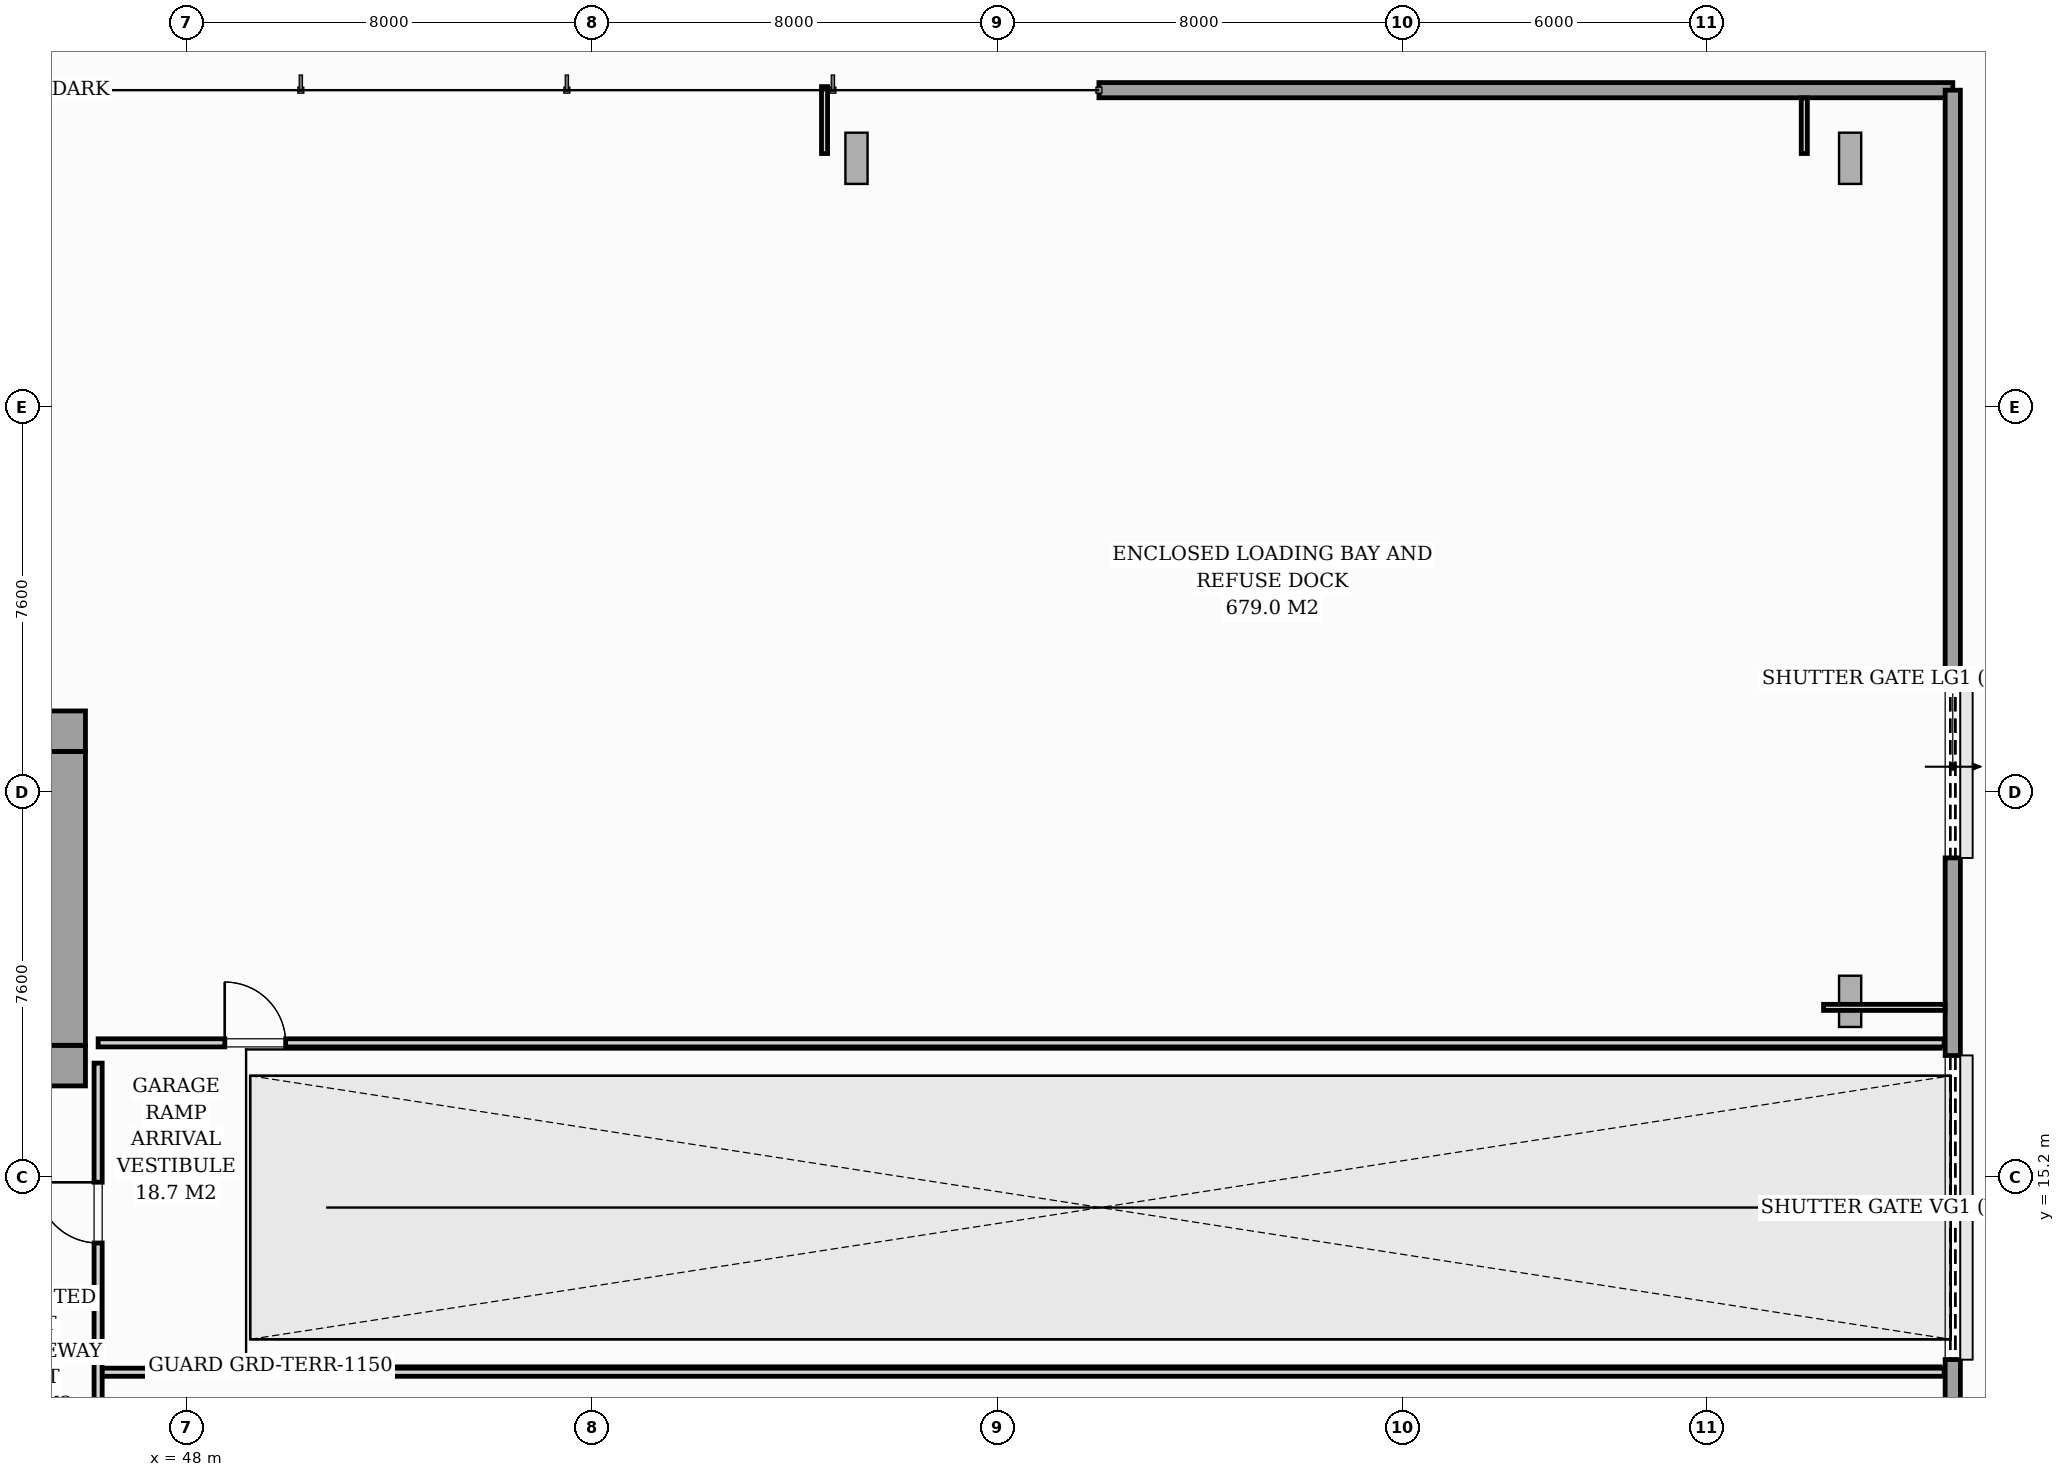
"""IFC4 building model, lengths in metres.
Left out: names, types, materials, properties, quantities, classifications, styles, units other than length and angle.
Written with IfcOpenShell. Run it as: python <this file> out.ifc"""

import sys

from ifc_helpers import new_model, si_unit, direction, frame, frame_2d, origin, origin_2d, place, context, subcontext, project, spatial, rectangle, i_section, extrude, source, transform, mapped, element, fill, save


model = new_model("IFC4")
c1 = context("Model", 3, precision=1e-05, world=origin(), true_north=direction((0.0, 1.0)))
c2 = subcontext(c1, "Body", "Model", "MODEL_VIEW")
j1 = project(units=[si_unit("LENGTHUNIT", "METRE"), si_unit("PLANEANGLEUNIT", "RADIAN")], contexts=[c1])
p1 = place(None, origin())
s1 = spatial("IfcSite", under=j1, at=p1, CompositionType="ELEMENT")
p2 = place(p1, origin())
s2 = spatial("IfcBuilding", under=s1, at=p2, CompositionType="ELEMENT")
p3 = place(p2, origin())
s3 = spatial("IfcBuildingStorey", under=s2, at=p3, CompositionType="ELEMENT", Elevation=0.0)
m1 = source(origin(), c2, "Body", "SweptSolid", [
    extrude(i_section(OverallWidth=0.437, OverallDepth=0.514, WebThickness=0.061, FlangeThickness=0.097, FilletRadius=0.018, at=origin_2d()), origin(), (0.0, 0.0, 1.0), 4.996),
])
for number, where, z_axis, x_axis in (
    (1, (45.6, 17.4, 0.002), (0.0, 0.0, 1.0), (1.0, 0.0, 0.0)),
    (2, (45.6, 24.0, 0.002), (0.0, 0.0, 1.0), (1.0, 0.0, 0.0)),
):
    element("IfcColumn", number, at=place(p3, frame(where, z_axis=z_axis, x_axis=x_axis)), inside=s3, PredefinedType="PILASTER", context=c2, shape_type="MappedRepresentation", body=[
        mapped(m1, transform((0.0, 0.0, 0.0), scale=1.0)),
    ])
m2 = source(origin(), c2, "Body", "SweptSolid", [
    extrude(i_section(OverallWidth=0.438, OverallDepth=1.011, WebThickness=0.041, FlangeThickness=0.074, FilletRadius=0.024, at=origin_2d()), origin(), (0.0, 0.0, 1.0), 5.12),
])
p4 = place(p3, frame((61.835, 35.586, 0.129), z_axis=(-0.488415288712, -0.221174585925, 0.844116288371), x_axis=(0.768948067591, 0.348211397919, 0.536160136253)))
e3 = element("IfcColumn", 3, at=p4, inside=s3, PredefinedType="COLUMN", context=c2, shape_type="MappedRepresentation", body=[
    mapped(m2, transform((0.0, 0.0, 0.0), scale=1.0)),
])
m3 = source(origin(), c2, "Body", "SweptSolid", [
    extrude(i_section(OverallWidth=0.438, OverallDepth=1.011, WebThickness=0.041, FlangeThickness=0.074, FilletRadius=0.024, at=origin_2d()), origin(), (0.0, 0.0, 1.0), 5.658),
])
p5 = place(p3, frame((81.691, 35.579, 0.156), z_axis=(-0.625927781854, -0.197654592174, 0.754418368079), x_axis=(0.719402526438, 0.227171915187, 0.656393880155)))
e4 = element("IfcColumn", 4, at=p5, inside=s3, PredefinedType="COLUMN", context=c2, shape_type="MappedRepresentation", body=[
    mapped(m3, transform((0.0, 0.0, 0.0), scale=1.0)),
])
m4 = source(origin(), c2, "Body", "SweptSolid", [
    extrude(i_section(OverallWidth=0.438, OverallDepth=1.011, WebThickness=0.041, FlangeThickness=0.074, FilletRadius=0.024, at=origin_2d()), origin(), (0.0, 0.0, 1.0), 5.575),
])
p6 = place(p3, frame((81.694, 18.783, 0.152), z_axis=(-0.636293391775, -0.083735492124, 0.766889227295), x_axis=(0.760333659123, 0.100059051294, 0.641779489434)))
e5 = element("IfcColumn", 5, at=p6, inside=s3, PredefinedType="COLUMN", context=c2, shape_type="MappedRepresentation", body=[
    mapped(m4, transform((0.0, 0.0, 0.0), scale=1.0)),
])
p7 = place(p3, frame((66.0, 36.65, 0.0), z_axis=(0.0, 0.0, 1.0), x_axis=(1.0, 0.0, 0.0)))
e6 = element("IfcWall", 6, at=p7, inside=s3, PredefinedType="STANDARD", context=c2, shape_type="SweptSolid", body=[
    extrude(rectangle(XDim=16.85, YDim=0.3, at=frame_2d((8.425, 0.0))), origin(), (0.0, 0.0, 1.0), 4.58),
])
p8 = place(p3, frame((82.85, 36.65, 0.0), z_axis=(0.0, 0.0, 1.0), x_axis=(0.0, -1.0, 0.0)))
e7 = element("IfcWall", 7, at=p8, inside=s3, PredefinedType="STANDARD", context=c2, shape_type="SweptSolid", body=[
    extrude(rectangle(XDim=35.7, YDim=0.3, at=frame_2d((17.85, 0.0))), origin(), (0.0, 0.0, 1.0), 4.58),
])
p9 = place(p8, frame((11.55, 0.0, 0.0)))
e8 = element("IfcOpeningElement", 8, at=p9, cuts=e7, PredefinedType="OPENING", context=c2, shape_type="SweptSolid", body=[
    extrude(rectangle(XDim=3.6, YDim=3.8, at=frame_2d((1.8, 1.9))), frame((0.0, 0.16, 0.0), z_axis=(0.0, -1.0, 0.0), x_axis=(1.0, 0.0, 0.0)), (0.0, 0.0, 1.0), 0.32),
])
p10 = place(p8, frame((19.05, 0.0, 0.0)))
e9 = element("IfcOpeningElement", 9, at=p10, cuts=e7, PredefinedType="OPENING", context=c2, shape_type="SweptSolid", body=[
    extrude(rectangle(XDim=6.0, YDim=3.2, at=frame_2d((3.0, 1.6))), frame((0.0, 0.16, 0.0), z_axis=(0.0, -1.0, 0.0), x_axis=(1.0, 0.0, 0.0)), (0.0, 0.0, 1.0), 0.32),
])
p11 = place(p8, frame((26.8, 0.0, 0.9)))
e10 = element("IfcOpeningElement", 10, at=p11, cuts=e7, PredefinedType="OPENING", context=c2, shape_type="SweptSolid", body=[
    extrude(rectangle(XDim=2.0, YDim=2.4, at=frame_2d((1.0, 1.2))), frame((0.0, 0.16, 0.0), z_axis=(0.0, -1.0, 0.0), x_axis=(1.0, 0.0, 0.0)), (0.0, 0.0, 1.0), 0.32),
])
p12 = place(p3, frame((26.0, 17.4, 0.0), z_axis=(0.0, 0.0, 1.0), x_axis=(1.0, 0.0, 0.0)))
e11 = element("IfcWall", 11, at=p12, inside=s3, PredefinedType="SHEAR", context=c2, shape_type="SweptSolid", body=[
    extrude(rectangle(XDim=20.0, YDim=0.8, at=frame_2d((10.0, 0.0))), origin(), (0.0, 0.0, 1.0), 5.0),
])
p13 = place(p12, frame((1.15, 0.0, 0.0)))
e12 = element("IfcOpeningElement", 12, at=p13, cuts=e11, PredefinedType="OPENING", context=c2, shape_type="SweptSolid", body=[
    extrude(rectangle(XDim=0.95, YDim=2.06, at=frame_2d((0.475, 1.03))), frame((0.0, 0.41, 0.0), z_axis=(0.0, -1.0, 0.0), x_axis=(1.0, 0.0, 0.0)), (0.0, 0.0, 1.0), 0.82),
])
p14 = place(p12, frame((9.58, 0.0, 0.0)))
e13 = element("IfcOpeningElement", 13, at=p14, cuts=e11, PredefinedType="OPENING", context=c2, shape_type="SweptSolid", body=[
    extrude(rectangle(XDim=0.9, YDim=2.06, at=frame_2d((0.45, 1.03))), frame((0.0, 0.41, 0.0), z_axis=(0.0, -1.0, 0.0), x_axis=(1.0, 0.0, 0.0)), (0.0, 0.0, 1.0), 0.82),
])
p15 = place(p12, frame((17.75, 0.0, 0.0)))
e14 = element("IfcOpeningElement", 14, at=p15, cuts=e11, PredefinedType="OPENING", context=c2, shape_type="SweptSolid", body=[
    extrude(rectangle(XDim=0.95, YDim=2.06, at=frame_2d((0.475, 1.03))), frame((0.0, 0.41, 0.0), z_axis=(0.0, -1.0, 0.0), x_axis=(1.0, 0.0, 0.0)), (0.0, 0.0, 1.0), 0.82),
])
p16 = place(p3, frame((26.0, 24.0, 0.0), z_axis=(0.0, 0.0, 1.0), x_axis=(1.0, 0.0, 0.0)))
e15 = element("IfcWall", 15, at=p16, inside=s3, PredefinedType="SHEAR", context=c2, shape_type="SweptSolid", body=[
    extrude(rectangle(XDim=20.0, YDim=0.8, at=frame_2d((10.0, 0.0))), origin(), (0.0, 0.0, 1.0), 5.0),
])
p17 = place(p3, frame((45.6, 17.802, 0.0), z_axis=(0.0, 0.0, 1.0), x_axis=(0.0, 1.0, 0.0)))
e16 = element("IfcWall", 16, at=p17, inside=s3, PredefinedType="SHEAR", context=c2, shape_type="SweptSolid", body=[
    extrude(rectangle(XDim=5.796, YDim=0.8, at=frame_2d((2.898, 0.0))), origin(), (0.0, 0.0, 1.0), 5.0),
])
p18 = place(p3, frame((46.25, 1.102, 0.0), z_axis=(0.0, 0.0, 1.0), x_axis=(0.0, 1.0, 0.0)))
e17 = element("IfcWall", 17, at=p18, inside=s3, PredefinedType="PARTITIONING", context=c2, shape_type="SweptSolid", body=[
    extrude(rectangle(XDim=16.348, YDim=0.16, at=frame_2d((8.174, 0.0))), origin(), (0.0, 0.0, 1.0), 4.58),
])
p19 = place(p18, frame((5.348, 0.0, 0.0)))
e18 = element("IfcOpeningElement", 18, at=p19, cuts=e17, PredefinedType="OPENING", context=c2, shape_type="SweptSolid", body=[
    extrude(rectangle(XDim=1.2, YDim=2.08, at=frame_2d((0.6, 1.04))), frame((0.0, 0.09, 0.0), z_axis=(0.0, -1.0, 0.0), x_axis=(1.0, 0.0, 0.0)), (0.0, 0.0, 1.0), 0.18),
])
p20 = place(p18, frame((12.798, 0.0, 0.0)))
e19 = element("IfcOpeningElement", 19, at=p20, cuts=e17, PredefinedType="OPENING", context=c2, shape_type="SweptSolid", body=[
    extrude(rectangle(XDim=1.2, YDim=2.08, at=frame_2d((0.6, 1.04))), frame((0.0, 0.09, 0.0), z_axis=(0.0, -1.0, 0.0), x_axis=(1.0, 0.0, 0.0)), (0.0, 0.0, 1.0), 0.18),
])
p21 = place(p3, frame((46.332, 11.35, 0.0), z_axis=(0.0, 0.0, 1.0), x_axis=(1.0, 0.0, 0.0)))
e20 = element("IfcWall", 20, at=p21, inside=s3, PredefinedType="PARTITIONING", context=c2, shape_type="SweptSolid", body=[
    extrude(rectangle(XDim=36.348, YDim=0.16, at=frame_2d((18.174, 0.0))), origin(), (0.0, 0.0, 1.0), 4.58),
])
p22 = place(p3, frame((46.25, 17.85, 0.0), z_axis=(0.0, 0.0, 1.0), x_axis=(1.0, 0.0, 0.0)))
e21 = element("IfcWall", 21, at=p22, inside=s3, PredefinedType="PARTITIONING", context=c2, shape_type="SweptSolid", body=[
    extrude(rectangle(XDim=36.43, YDim=0.16, at=frame_2d((18.215, 0.0))), origin(), (0.0, 0.0, 1.0), 3.536),
])
p23 = place(p22, frame((2.5, 0.0, 0.0)))
e22 = element("IfcOpeningElement", 22, at=p23, cuts=e21, PredefinedType="OPENING", context=c2, shape_type="SweptSolid", body=[
    extrude(rectangle(XDim=1.2, YDim=2.08, at=frame_2d((0.6, 1.04))), frame((0.0, 0.09, 0.0), z_axis=(0.0, -1.0, 0.0), x_axis=(1.0, 0.0, 0.0)), (0.0, 0.0, 1.0), 0.18),
])
p24 = place(p3, frame((60.585, 35.4, 0.0), z_axis=(0.0, 0.0, 1.0), x_axis=(0.0, 1.0, 0.0)))
e23 = element("IfcWall", 23, at=p24, inside=s3, PredefinedType="PARTITIONING", context=c2, shape_type="SweptSolid", body=[
    extrude(rectangle(XDim=1.32, YDim=0.12, at=frame_2d((0.66, 0.0))), origin(), (0.0, 0.0, 1.0), 4.58),
])
p25 = place(p3, frame((79.92, 35.4, 0.0), z_axis=(0.0, 0.0, 1.0), x_axis=(0.0, 1.0, 0.0)))
e24 = element("IfcWall", 24, at=p25, inside=s3, PredefinedType="PARTITIONING", context=c2, shape_type="SweptSolid", body=[
    extrude(rectangle(XDim=1.098, YDim=0.12, at=frame_2d((0.549, 0.0))), origin(), (0.0, 0.0, 1.0), 4.58),
])
p26 = place(p3, frame((80.3, 18.55, 0.0), z_axis=(0.0, 0.0, 1.0), x_axis=(1.0, 0.0, 0.0)))
e25 = element("IfcWall", 25, at=p26, inside=s3, PredefinedType="PARTITIONING", context=c2, shape_type="SweptSolid", body=[
    extrude(rectangle(XDim=2.398, YDim=0.12, at=frame_2d((1.199, 0.0))), origin(), (0.0, 0.0, 1.0), 4.58),
])
m5 = source(origin(), c2, "Body", "SweptSolid", [
    extrude(rectangle(XDim=3.6, YDim=3.8, at=frame_2d((1.8, 1.9))), frame((0.0, 0.025, 0.0), z_axis=(0.0, -1.0, 0.0), x_axis=(1.0, 0.0, 0.0)), (0.0, 0.0, 1.0), 0.05),
])
p27 = place(p9, origin())
e26 = element("IfcDoor", 26, at=p27, inside=s3, OperationType="ROLLINGUP", PredefinedType="GATE", context=c2, shape_type="MappedRepresentation", body=[
    mapped(m5, transform((0.0, 0.0, 0.0), scale=1.0)),
])
fill(e8, e26)
m6 = source(origin(), c2, "Body", "SweptSolid", [
    extrude(rectangle(XDim=6.0, YDim=3.2, at=frame_2d((3.0, 1.6))), frame((0.0, 0.025, 0.0), z_axis=(0.0, -1.0, 0.0), x_axis=(1.0, 0.0, 0.0)), (0.0, 0.0, 1.0), 0.05),
])
p28 = place(p10, origin())
e27 = element("IfcDoor", 27, at=p28, inside=s3, OperationType="ROLLINGUP", PredefinedType="GATE", context=c2, shape_type="MappedRepresentation", body=[
    mapped(m6, transform((0.0, 0.0, 0.0), scale=1.0)),
])
fill(e9, e27)
m7 = source(origin(), c2, "Body", "SweptSolid", [
    extrude(rectangle(XDim=1.2, YDim=2.08, at=frame_2d((0.6, 1.04))), frame((0.0, 0.025, 0.0), z_axis=(0.0, -1.0, 0.0), x_axis=(1.0, 0.0, 0.0)), (0.0, 0.0, 1.0), 0.05),
])
p29 = place(p20, origin())
e28 = element("IfcDoor", 28, at=p29, inside=s3, OperationType="SINGLE_SWING_RIGHT", PredefinedType="DOOR", context=c2, shape_type="MappedRepresentation", body=[
    mapped(m7, transform((0.0, 0.0, 0.0), scale=1.0)),
])
fill(e19, e28)
p30 = place(p23, origin())
e29 = element("IfcDoor", 29, at=p30, inside=s3, OperationType="SINGLE_SWING_LEFT", PredefinedType="DOOR", context=c2, shape_type="MappedRepresentation", body=[
    mapped(m7, transform((0.0, 0.0, 0.0), scale=1.0)),
])
fill(e22, e29)
save(model, sys.argv[1])
